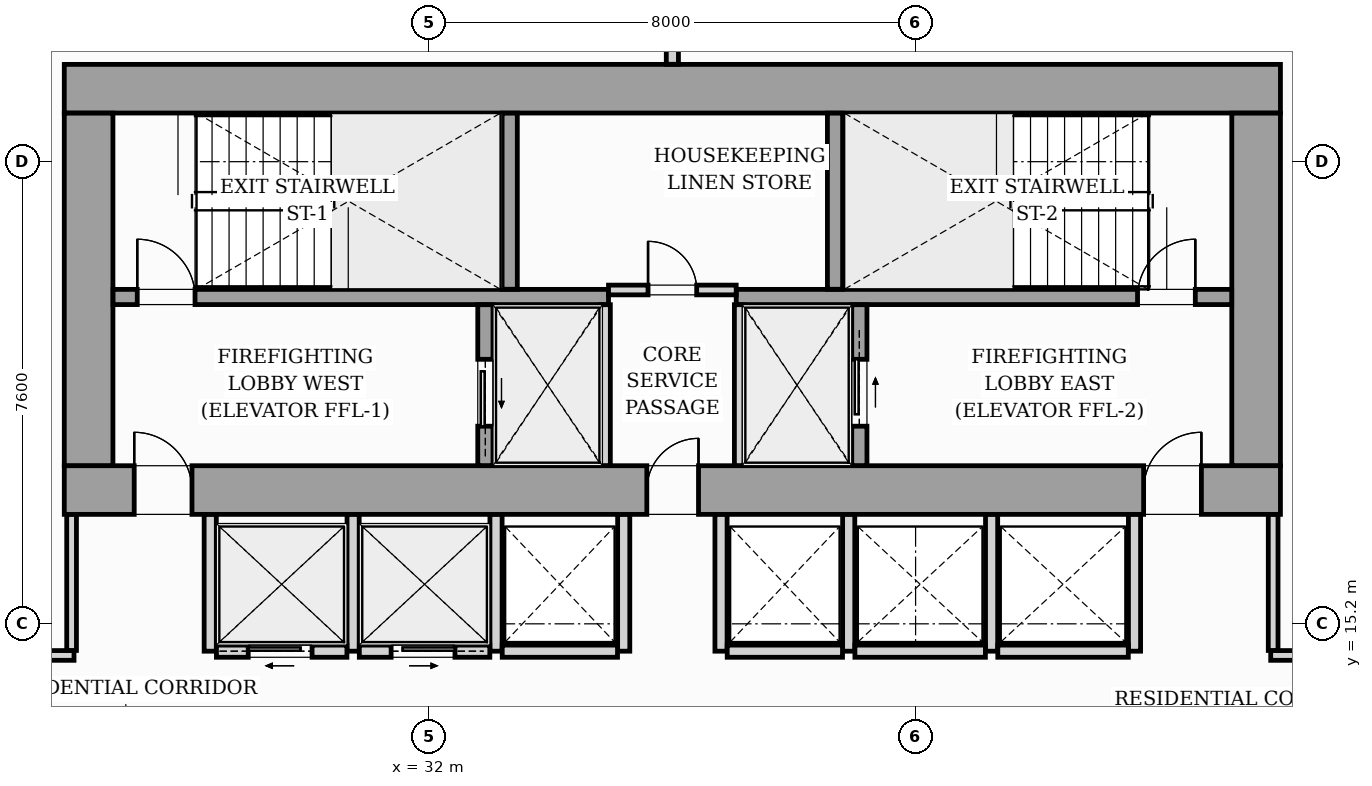
"""IFC4 building model, lengths in metres.
Left out: names, types, materials, properties, quantities, classifications, styles, units other than length and angle.
Written with IfcOpenShell. Run it as: python <this file> out.ifc"""

import sys

from ifc_helpers import new_model, si_unit, direction, frame, frame_2d, origin, origin_2d, place, context, subcontext, project, spatial, rectangle, i_section, extrude, source, transform, mapped, element, fill, save


model = new_model("IFC4")
c1 = context("Model", 3, precision=1e-05, world=origin(), true_north=direction((0.0, 1.0)))
c2 = subcontext(c1, "Body", "Model", "MODEL_VIEW")
j1 = project(units=[si_unit("LENGTHUNIT", "METRE"), si_unit("PLANEANGLEUNIT", "RADIAN")], contexts=[c1])
p1 = place(None, origin())
s1 = spatial("IfcSite", under=j1, at=p1, CompositionType="ELEMENT")
p2 = place(p1, origin())
s2 = spatial("IfcBuilding", under=s1, at=p2, CompositionType="ELEMENT")
p3 = place(p2, frame((0.0, 0.0, 26.2)))
s3 = spatial("IfcBuildingStorey", under=s2, at=p3, CompositionType="ELEMENT", Elevation=26.2)
m1 = source(origin(), c2, "Body", "SweptSolid", [
    extrude(i_section(OverallWidth=0.437, OverallDepth=0.514, WebThickness=0.061, FlangeThickness=0.097, FilletRadius=0.018, at=origin_2d()), origin(), (0.0, 0.0, 1.0), 3.196),
])
for number, where, z_axis, x_axis in (
    (1, (26.4, 17.4, 0.002), (0.0, 0.0, 1.0), (1.0, 0.0, 0.0)),
    (2, (33.12, 17.4, 0.002), (0.0, 0.0, 1.0), (1.0, 0.0, 0.0)),
    (3, (38.88, 17.4, 0.002), (0.0, 0.0, 1.0), (1.0, 0.0, 0.0)),
    (4, (45.6, 17.4, 0.002), (0.0, 0.0, 1.0), (1.0, 0.0, 0.0)),
    (5, (26.4, 24.0, 0.002), (0.0, 0.0, 1.0), (1.0, 0.0, 0.0)),
    (6, (33.12, 24.0, 0.002), (0.0, 0.0, 1.0), (1.0, 0.0, 0.0)),
    (7, (38.88, 24.0, 0.002), (0.0, 0.0, 1.0), (1.0, 0.0, 0.0)),
    (8, (45.6, 24.0, 0.002), (0.0, 0.0, 1.0), (1.0, 0.0, 0.0)),
):
    element("IfcColumn", number, at=place(p3, frame(where, z_axis=z_axis, x_axis=x_axis)), inside=s3, PredefinedType="PILASTER", context=c2, shape_type="MappedRepresentation", body=[
        mapped(m1, transform((0.0, 0.0, 0.0), scale=1.0)),
    ])
p4 = place(p3, frame((26.0, 17.4, 0.0), z_axis=(0.0, 0.0, 1.0), x_axis=(1.0, 0.0, 0.0)))
e9 = element("IfcWall", 9, at=p4, inside=s3, PredefinedType="SHEAR", context=c2, shape_type="SweptSolid", body=[
    extrude(rectangle(XDim=20.0, YDim=0.8, at=frame_2d((10.0, 0.0))), origin(), (0.0, 0.0, 1.0), 3.2),
])
p5 = place(p4, frame((1.15, 0.0, 0.0)))
e10 = element("IfcOpeningElement", 10, at=p5, cuts=e9, PredefinedType="OPENING", context=c2, shape_type="SweptSolid", body=[
    extrude(rectangle(XDim=0.95, YDim=2.06, at=frame_2d((0.475, 1.03))), frame((0.0, 0.41, 0.0), z_axis=(0.0, -1.0, 0.0), x_axis=(1.0, 0.0, 0.0)), (0.0, 0.0, 1.0), 0.82),
])
p6 = place(p4, frame((9.58, 0.0, 0.0)))
e11 = element("IfcOpeningElement", 11, at=p6, cuts=e9, PredefinedType="OPENING", context=c2, shape_type="SweptSolid", body=[
    extrude(rectangle(XDim=0.85, YDim=2.0, at=frame_2d((0.425, 1.0))), frame((0.0, 0.41, 0.0), z_axis=(0.0, -1.0, 0.0), x_axis=(1.0, 0.0, 0.0)), (0.0, 0.0, 1.0), 0.82),
])
p7 = place(p4, frame((17.75, 0.0, 0.0)))
e12 = element("IfcOpeningElement", 12, at=p7, cuts=e9, PredefinedType="OPENING", context=c2, shape_type="SweptSolid", body=[
    extrude(rectangle(XDim=0.95, YDim=2.06, at=frame_2d((0.475, 1.03))), frame((0.0, 0.41, 0.0), z_axis=(0.0, -1.0, 0.0), x_axis=(1.0, 0.0, 0.0)), (0.0, 0.0, 1.0), 0.82),
])
p8 = place(p3, frame((26.0, 24.0, 0.0), z_axis=(0.0, 0.0, 1.0), x_axis=(1.0, 0.0, 0.0)))
e13 = element("IfcWall", 13, at=p8, inside=s3, PredefinedType="SHEAR", context=c2, shape_type="SweptSolid", body=[
    extrude(rectangle(XDim=20.0, YDim=0.8, at=frame_2d((10.0, 0.0))), origin(), (0.0, 0.0, 1.0), 3.2),
])
for number, where, z_axis, x_axis in (
    (14, (26.4, 17.802, 0.0), (0.0, 0.0, 1.0), (0.0, 1.0, 0.0)),
    (15, (45.6, 17.802, 0.0), (0.0, 0.0, 1.0), (0.0, 1.0, 0.0)),
):
    element("IfcWall", number, at=place(p3, frame(where, z_axis=z_axis, x_axis=x_axis)), inside=s3, PredefinedType="SHEAR", context=c2, shape_type="SweptSolid", body=[
        extrude(rectangle(XDim=5.796, YDim=0.8, at=frame_2d((2.898, 0.0))), origin(), (0.0, 0.0, 1.0), 3.2),
    ])
p9 = place(p3, frame((26.802, 20.575, 0.0), z_axis=(0.0, 0.0, 1.0), x_axis=(1.0, 0.0, 0.0)))
e16 = element("IfcWall", 16, at=p9, inside=s3, PredefinedType="SOLIDWALL", context=c2, shape_type="SweptSolid", body=[
    extrude(rectangle(XDim=8.148, YDim=0.25, at=frame_2d((4.074, 0.0))), origin(), (0.0, 0.0, 1.0), 3.2),
])
p10 = place(p9, frame((0.398, 0.0, 0.0)))
e17 = element("IfcOpeningElement", 17, at=p10, cuts=e16, PredefinedType="OPENING", context=c2, shape_type="SweptSolid", body=[
    extrude(rectangle(XDim=0.95, YDim=2.06, at=frame_2d((0.475, 1.03))), frame((0.0, 0.135, 0.0), z_axis=(0.0, -1.0, 0.0), x_axis=(1.0, 0.0, 0.0)), (0.0, 0.0, 1.0), 0.27),
])
p11 = place(p3, frame((37.05, 20.575, 0.0), z_axis=(0.0, 0.0, 1.0), x_axis=(1.0, 0.0, 0.0)))
e18 = element("IfcWall", 18, at=p11, inside=s3, PredefinedType="SOLIDWALL", context=c2, shape_type="SweptSolid", body=[
    extrude(rectangle(XDim=8.148, YDim=0.25, at=frame_2d((4.074, 0.0))), origin(), (0.0, 0.0, 1.0), 3.2),
])
p12 = place(p11, frame((6.6, 0.0, 0.0)))
e19 = element("IfcOpeningElement", 19, at=p12, cuts=e18, PredefinedType="OPENING", context=c2, shape_type="SweptSolid", body=[
    extrude(rectangle(XDim=0.95, YDim=2.06, at=frame_2d((0.475, 1.03))), frame((0.0, 0.135, 0.0), z_axis=(0.0, -1.0, 0.0), x_axis=(1.0, 0.0, 0.0)), (0.0, 0.0, 1.0), 0.27),
])
for number, where, z_axis, x_axis in (
    (20, (33.325, 20.702, 0.0), (0.0, 0.0, 1.0), (0.0, 1.0, 0.0)),
    (21, (38.675, 20.702, 0.0), (0.0, 0.0, 1.0), (0.0, 1.0, 0.0)),
):
    element("IfcWall", number, at=place(p3, frame(where, z_axis=z_axis, x_axis=x_axis)), inside=s3, PredefinedType="SOLIDWALL", context=c2, shape_type="SweptSolid", body=[
        extrude(rectangle(XDim=2.896, YDim=0.25, at=frame_2d((1.448, 0.0))), origin(), (0.0, 0.0, 1.0), 3.2),
    ])
p13 = place(p3, frame((32.925, 17.802, 0.0), z_axis=(0.0, 0.0, 1.0), x_axis=(0.0, 1.0, 0.0)))
e22 = element("IfcWall", 22, at=p13, inside=s3, PredefinedType="SOLIDWALL", context=c2, shape_type="SweptSolid", body=[
    extrude(rectangle(XDim=2.646, YDim=0.25, at=frame_2d((1.323, 0.0))), origin(), (0.0, 0.0, 1.0), 3.2),
])
p14 = place(p13, frame((0.648, 0.0, 0.0)))
e23 = element("IfcOpeningElement", 23, at=p14, cuts=e22, PredefinedType="OPENING", context=c2, shape_type="SweptSolid", body=[
    extrude(rectangle(XDim=1.1, YDim=2.08, at=frame_2d((0.55, 1.04))), frame((0.0, 0.135, 0.0), z_axis=(0.0, -1.0, 0.0), x_axis=(1.0, 0.0, 0.0)), (0.0, 0.0, 1.0), 0.27),
])
for number, where, z_axis, x_axis in (
    (24, (34.9, 17.802, 0.0), (0.0, 0.0, 1.0), (0.0, 1.0, 0.0)),
    (25, (37.1, 17.802, 0.0), (0.0, 0.0, 1.0), (0.0, 1.0, 0.0)),
):
    element("IfcWall", number, at=place(p3, frame(where, z_axis=z_axis, x_axis=x_axis)), inside=s3, PredefinedType="PARTITIONING", context=c2, shape_type="SweptSolid", body=[
        extrude(rectangle(XDim=2.646, YDim=0.16, at=frame_2d((1.323, 0.0))), origin(), (0.0, 0.0, 1.0), 2.94),
    ])
p15 = place(p3, frame((39.075, 17.802, 0.0), z_axis=(0.0, 0.0, 1.0), x_axis=(0.0, 1.0, 0.0)))
e26 = element("IfcWall", 26, at=p15, inside=s3, PredefinedType="SOLIDWALL", context=c2, shape_type="SweptSolid", body=[
    extrude(rectangle(XDim=2.646, YDim=0.25, at=frame_2d((1.323, 0.0))), origin(), (0.0, 0.0, 1.0), 3.2),
])
p16 = place(p15, frame((0.648, 0.0, 0.0)))
e27 = element("IfcOpeningElement", 27, at=p16, cuts=e26, PredefinedType="OPENING", context=c2, shape_type="SweptSolid", body=[
    extrude(rectangle(XDim=1.1, YDim=2.08, at=frame_2d((0.55, 1.04))), frame((0.0, 0.135, 0.0), z_axis=(0.0, -1.0, 0.0), x_axis=(1.0, 0.0, 0.0)), (0.0, 0.0, 1.0), 0.27),
])
p17 = place(p3, frame((34.95, 20.69, 0.0), z_axis=(0.0, 0.0, 1.0), x_axis=(1.0, 0.0, 0.0)))
e28 = element("IfcWall", 28, at=p17, inside=s3, PredefinedType="PARTITIONING", context=c2, shape_type="SweptSolid", body=[
    extrude(rectangle(XDim=2.1, YDim=0.16, at=frame_2d((1.05, 0.0))), origin(), (0.0, 0.0, 1.0), 2.94),
])
p18 = place(p17, frame((0.65, 0.0, 0.0)))
e29 = element("IfcOpeningElement", 29, at=p18, cuts=e28, PredefinedType="OPENING", context=c2, shape_type="SweptSolid", body=[
    extrude(rectangle(XDim=0.8, YDim=2.05, at=frame_2d((0.4, 1.025))), frame((0.0, 0.09, 0.0), z_axis=(0.0, -1.0, 0.0), x_axis=(1.0, 0.0, 0.0)), (0.0, 0.0, 1.0), 0.18),
])
for number, where, z_axis, x_axis in (
    (30, (28.4, 14.75, 0.0), (0.0, 0.0, 1.0), (0.0, 1.0, 0.0)),
    (31, (30.75, 14.75, 0.0), (0.0, 0.0, 1.0), (0.0, 1.0, 0.0)),
    (32, (33.1, 14.75, 0.0), (0.0, 0.0, 1.0), (0.0, 1.0, 0.0)),
):
    element("IfcWall", number, at=place(p3, frame(where, z_axis=z_axis, x_axis=x_axis)), inside=s3, PredefinedType="PARTITIONING", context=c2, shape_type="SweptSolid", body=[
        extrude(rectangle(XDim=2.248, YDim=0.2, at=frame_2d((1.124, 0.0))), origin(), (0.0, 0.0, 1.0), 2.94),
    ])
p19 = place(p3, frame((28.502, 14.75, 0.0), z_axis=(0.0, 0.0, 1.0), x_axis=(1.0, 0.0, 0.0)))
e33 = element("IfcWall", 33, at=p19, inside=s3, PredefinedType="PARTITIONING", context=c2, shape_type="SweptSolid", body=[
    extrude(rectangle(XDim=2.146, YDim=0.2, at=frame_2d((1.073, 0.0))), origin(), (0.0, 0.0, 1.0), 2.94),
])
p20 = place(p19, frame((0.523, 0.0, 0.0)))
e34 = element("IfcOpeningElement", 34, at=p20, cuts=e33, PredefinedType="OPENING", context=c2, shape_type="SweptSolid", body=[
    extrude(rectangle(XDim=1.05, YDim=2.08, at=frame_2d((0.525, 1.04))), frame((0.0, 0.11, 0.0), z_axis=(0.0, -1.0, 0.0), x_axis=(1.0, 0.0, 0.0)), (0.0, 0.0, 1.0), 0.22),
])
p21 = place(p3, frame((30.852, 14.75, 0.0), z_axis=(0.0, 0.0, 1.0), x_axis=(1.0, 0.0, 0.0)))
e35 = element("IfcWall", 35, at=p21, inside=s3, PredefinedType="PARTITIONING", context=c2, shape_type="SweptSolid", body=[
    extrude(rectangle(XDim=2.146, YDim=0.2, at=frame_2d((1.073, 0.0))), origin(), (0.0, 0.0, 1.0), 2.94),
])
p22 = place(p21, frame((0.523, 0.0, 0.0)))
e36 = element("IfcOpeningElement", 36, at=p22, cuts=e35, PredefinedType="OPENING", context=c2, shape_type="SweptSolid", body=[
    extrude(rectangle(XDim=1.05, YDim=2.08, at=frame_2d((0.525, 1.04))), frame((0.0, 0.11, 0.0), z_axis=(0.0, -1.0, 0.0), x_axis=(1.0, 0.0, 0.0)), (0.0, 0.0, 1.0), 0.22),
])
p23 = place(p3, frame((35.2, 14.75, 0.0), z_axis=(0.0, 0.0, 1.0), x_axis=(0.0, 1.0, 0.0)))
e37 = element("IfcWall", 37, at=p23, inside=s3, PredefinedType="PARTITIONING", context=c2, shape_type="SweptSolid", body=[
    extrude(rectangle(XDim=2.248, YDim=0.2, at=frame_2d((1.124, 0.0))), origin(), (0.0, 0.0, 1.0), 2.94),
])
p24 = place(p3, frame((33.202, 14.75, 0.0), z_axis=(0.0, 0.0, 1.0), x_axis=(1.0, 0.0, 0.0)))
e38 = element("IfcWall", 38, at=p24, inside=s3, PredefinedType="PARTITIONING", context=c2, shape_type="SweptSolid", body=[
    extrude(rectangle(XDim=1.896, YDim=0.2, at=frame_2d((0.948, 0.0))), origin(), (0.0, 0.0, 1.0), 2.94),
])
for number, where, z_axis, x_axis in (
    (39, (36.8, 14.75, 0.0), (0.0, 0.0, 1.0), (0.0, 1.0, 0.0)),
    (40, (38.9, 14.75, 0.0), (0.0, 0.0, 1.0), (0.0, 1.0, 0.0)),
):
    element("IfcWall", number, at=place(p3, frame(where, z_axis=z_axis, x_axis=x_axis)), inside=s3, PredefinedType="PARTITIONING", context=c2, shape_type="SweptSolid", body=[
        extrude(rectangle(XDim=2.248, YDim=0.2, at=frame_2d((1.124, 0.0))), origin(), (0.0, 0.0, 1.0), 2.94),
    ])
p25 = place(p3, frame((36.902, 14.75, 0.0), z_axis=(0.0, 0.0, 1.0), x_axis=(1.0, 0.0, 0.0)))
e41 = element("IfcWall", 41, at=p25, inside=s3, PredefinedType="PARTITIONING", context=c2, shape_type="SweptSolid", body=[
    extrude(rectangle(XDim=1.896, YDim=0.2, at=frame_2d((0.948, 0.0))), origin(), (0.0, 0.0, 1.0), 2.94),
])
for number, where, z_axis, x_axis in (
    (42, (41.25, 14.75, 0.0), (0.0, 0.0, 1.0), (0.0, 1.0, 0.0)),
    (43, (43.6, 14.75, 0.0), (0.0, 0.0, 1.0), (0.0, 1.0, 0.0)),
):
    element("IfcWall", number, at=place(p3, frame(where, z_axis=z_axis, x_axis=x_axis)), inside=s3, PredefinedType="PARTITIONING", context=c2, shape_type="SweptSolid", body=[
        extrude(rectangle(XDim=2.248, YDim=0.2, at=frame_2d((1.124, 0.0))), origin(), (0.0, 0.0, 1.0), 2.94),
    ])
for number, where, z_axis, x_axis in (
    (44, (39.002, 14.75, 0.0), (0.0, 0.0, 1.0), (1.0, 0.0, 0.0)),
    (45, (41.352, 14.75, 0.0), (0.0, 0.0, 1.0), (1.0, 0.0, 0.0)),
):
    element("IfcWall", number, at=place(p3, frame(where, z_axis=z_axis, x_axis=x_axis)), inside=s3, PredefinedType="PARTITIONING", context=c2, shape_type="SweptSolid", body=[
        extrude(rectangle(XDim=2.146, YDim=0.2, at=frame_2d((1.073, 0.0))), origin(), (0.0, 0.0, 1.0), 2.94),
    ])
p26 = place(p3, frame((36.0, 24.402, 0.0), z_axis=(0.0, 0.0, 1.0), x_axis=(0.0, 1.0, 0.0)))
e46 = element("IfcWall", 46, at=p26, inside=s3, PredefinedType="PARTITIONING", context=c2, shape_type="SweptSolid", body=[
    extrude(rectangle(XDim=3.218, YDim=0.2, at=frame_2d((1.609, 0.0))), origin(), (0.0, 0.0, 1.0), 2.94),
])
p27 = place(p3, frame((15.282, 14.68, 0.0), z_axis=(0.0, 0.0, 1.0), x_axis=(1.0, 0.0, 0.0)))
e47 = element("IfcWall", 47, at=p27, inside=s3, PredefinedType="PARTITIONING", context=c2, shape_type="SweptSolid", body=[
    extrude(rectangle(XDim=10.878, YDim=0.16, at=frame_2d((5.439, 0.0))), origin(), (0.0, 0.0, 1.0), 2.94),
])
p28 = place(p27, frame((4.863, 0.0, 0.0)))
e48 = element("IfcOpeningElement", 48, at=p28, cuts=e47, PredefinedType="OPENING", context=c2, shape_type="SweptSolid", body=[
    extrude(rectangle(XDim=0.95, YDim=2.06, at=frame_2d((0.475, 1.03))), frame((0.0, 0.09, 0.0), z_axis=(0.0, -1.0, 0.0), x_axis=(1.0, 0.0, 0.0)), (0.0, 0.0, 1.0), 0.18),
])
p29 = place(p3, frame((26.12, 14.762, 0.0), z_axis=(0.0, 0.0, 1.0), x_axis=(0.0, 1.0, 0.0)))
e49 = element("IfcWall", 49, at=p29, inside=s3, PredefinedType="PARTITIONING", context=c2, shape_type="SweptSolid", body=[
    extrude(rectangle(XDim=2.236, YDim=0.16, at=frame_2d((1.118, 0.0))), origin(), (0.0, 0.0, 1.0), 2.94),
])
p30 = place(p3, frame((45.84, 14.68, 0.0), z_axis=(0.0, 0.0, 1.0), x_axis=(1.0, 0.0, 0.0)))
e50 = element("IfcWall", 50, at=p30, inside=s3, PredefinedType="PARTITIONING", context=c2, shape_type="SweptSolid", body=[
    extrude(rectangle(XDim=6.378, YDim=0.16, at=frame_2d((3.189, 0.0))), origin(), (0.0, 0.0, 1.0), 2.94),
])
p31 = place(p30, frame((2.815, 0.0, 0.0)))
e51 = element("IfcOpeningElement", 51, at=p31, cuts=e50, PredefinedType="OPENING", context=c2, shape_type="SweptSolid", body=[
    extrude(rectangle(XDim=0.95, YDim=2.06, at=frame_2d((0.475, 1.03))), frame((0.0, 0.09, 0.0), z_axis=(0.0, -1.0, 0.0), x_axis=(1.0, 0.0, 0.0)), (0.0, 0.0, 1.0), 0.18),
])
p32 = place(p3, frame((45.88, 14.762, 0.0), z_axis=(0.0, 0.0, 1.0), x_axis=(0.0, 1.0, 0.0)))
e52 = element("IfcWall", 52, at=p32, inside=s3, PredefinedType="PARTITIONING", context=c2, shape_type="SweptSolid", body=[
    extrude(rectangle(XDim=2.236, YDim=0.16, at=frame_2d((1.118, 0.0))), origin(), (0.0, 0.0, 1.0), 2.94),
])
m2 = source(origin(), c2, "Body", "SweptSolid", [
    extrude(rectangle(XDim=0.95, YDim=2.06, at=frame_2d((0.475, 1.03))), frame((0.0, 0.025, 0.0), z_axis=(0.0, -1.0, 0.0), x_axis=(1.0, 0.0, 0.0)), (0.0, 0.0, 1.0), 0.05),
])
p33 = place(p5, origin())
e53 = element("IfcDoor", 53, at=p33, inside=s3, OperationType="SINGLE_SWING_LEFT", PredefinedType="DOOR", context=c2, shape_type="MappedRepresentation", body=[
    mapped(m2, transform((0.0, 0.0, 0.0), scale=1.0)),
])
fill(e10, e53)
m3 = source(origin(), c2, "Body", "SweptSolid", [
    extrude(rectangle(XDim=0.85, YDim=2.0, at=frame_2d((0.425, 1.0))), frame((0.0, 0.025, 0.0), z_axis=(0.0, -1.0, 0.0), x_axis=(1.0, 0.0, 0.0)), (0.0, 0.0, 1.0), 0.05),
])
p34 = place(p6, origin())
e54 = element("IfcDoor", 54, at=p34, inside=s3, OperationType="SINGLE_SWING_RIGHT", PredefinedType="DOOR", context=c2, shape_type="MappedRepresentation", body=[
    mapped(m3, transform((0.0, 0.0, 0.0), scale=1.0)),
])
fill(e11, e54)
p35 = place(p7, origin())
e55 = element("IfcDoor", 55, at=p35, inside=s3, OperationType="SINGLE_SWING_RIGHT", PredefinedType="DOOR", context=c2, shape_type="MappedRepresentation", body=[
    mapped(m2, transform((0.0, 0.0, 0.0), scale=1.0)),
])
fill(e12, e55)
p36 = place(p10, origin())
e56 = element("IfcDoor", 56, at=p36, inside=s3, OperationType="SINGLE_SWING_LEFT", PredefinedType="DOOR", context=c2, shape_type="MappedRepresentation", body=[
    mapped(m2, transform((0.0, 0.0, 0.0), scale=1.0)),
])
fill(e17, e56)
p37 = place(p12, origin())
e57 = element("IfcDoor", 57, at=p37, inside=s3, OperationType="SINGLE_SWING_RIGHT", PredefinedType="DOOR", context=c2, shape_type="MappedRepresentation", body=[
    mapped(m2, transform((0.0, 0.0, 0.0), scale=1.0)),
])
fill(e19, e57)
m4 = source(origin(), c2, "Body", "SweptSolid", [
    extrude(rectangle(XDim=1.1, YDim=2.08, at=frame_2d((0.55, 1.04))), frame((0.0, 0.025, 0.0), z_axis=(0.0, -1.0, 0.0), x_axis=(1.0, 0.0, 0.0)), (0.0, 0.0, 1.0), 0.05),
])
p38 = place(p14, origin())
e58 = element("IfcDoor", 58, at=p38, inside=s3, OperationType="SLIDING_TO_LEFT", PredefinedType="DOOR", context=c2, shape_type="MappedRepresentation", body=[
    mapped(m4, transform((0.0, 0.0, 0.0), scale=1.0)),
])
fill(e23, e58)
p39 = place(p16, origin())
e59 = element("IfcDoor", 59, at=p39, inside=s3, OperationType="SLIDING_TO_RIGHT", PredefinedType="DOOR", context=c2, shape_type="MappedRepresentation", body=[
    mapped(m4, transform((0.0, 0.0, 0.0), scale=1.0)),
])
fill(e27, e59)
m5 = source(origin(), c2, "Body", "SweptSolid", [
    extrude(rectangle(XDim=0.8, YDim=2.05, at=frame_2d((0.4, 1.025))), frame((0.0, 0.025, 0.0), z_axis=(0.0, -1.0, 0.0), x_axis=(1.0, 0.0, 0.0)), (0.0, 0.0, 1.0), 0.05),
])
p40 = place(p18, origin())
e60 = element("IfcDoor", 60, at=p40, inside=s3, OperationType="SINGLE_SWING_LEFT", PredefinedType="DOOR", context=c2, shape_type="MappedRepresentation", body=[
    mapped(m5, transform((0.0, 0.0, 0.0), scale=1.0)),
])
fill(e29, e60)
m6 = source(origin(), c2, "Body", "SweptSolid", [
    extrude(rectangle(XDim=1.05, YDim=2.08, at=frame_2d((0.525, 1.04))), frame((0.0, 0.025, 0.0), z_axis=(0.0, -1.0, 0.0), x_axis=(1.0, 0.0, 0.0)), (0.0, 0.0, 1.0), 0.05),
])
p41 = place(p20, origin())
e61 = element("IfcDoor", 61, at=p41, inside=s3, OperationType="SLIDING_TO_LEFT", PredefinedType="DOOR", context=c2, shape_type="MappedRepresentation", body=[
    mapped(m6, transform((0.0, 0.0, 0.0), scale=1.0)),
])
fill(e34, e61)
p42 = place(p22, origin())
e62 = element("IfcDoor", 62, at=p42, inside=s3, OperationType="SLIDING_TO_RIGHT", PredefinedType="DOOR", context=c2, shape_type="MappedRepresentation", body=[
    mapped(m6, transform((0.0, 0.0, 0.0), scale=1.0)),
])
fill(e36, e62)
save(model, sys.argv[1])
